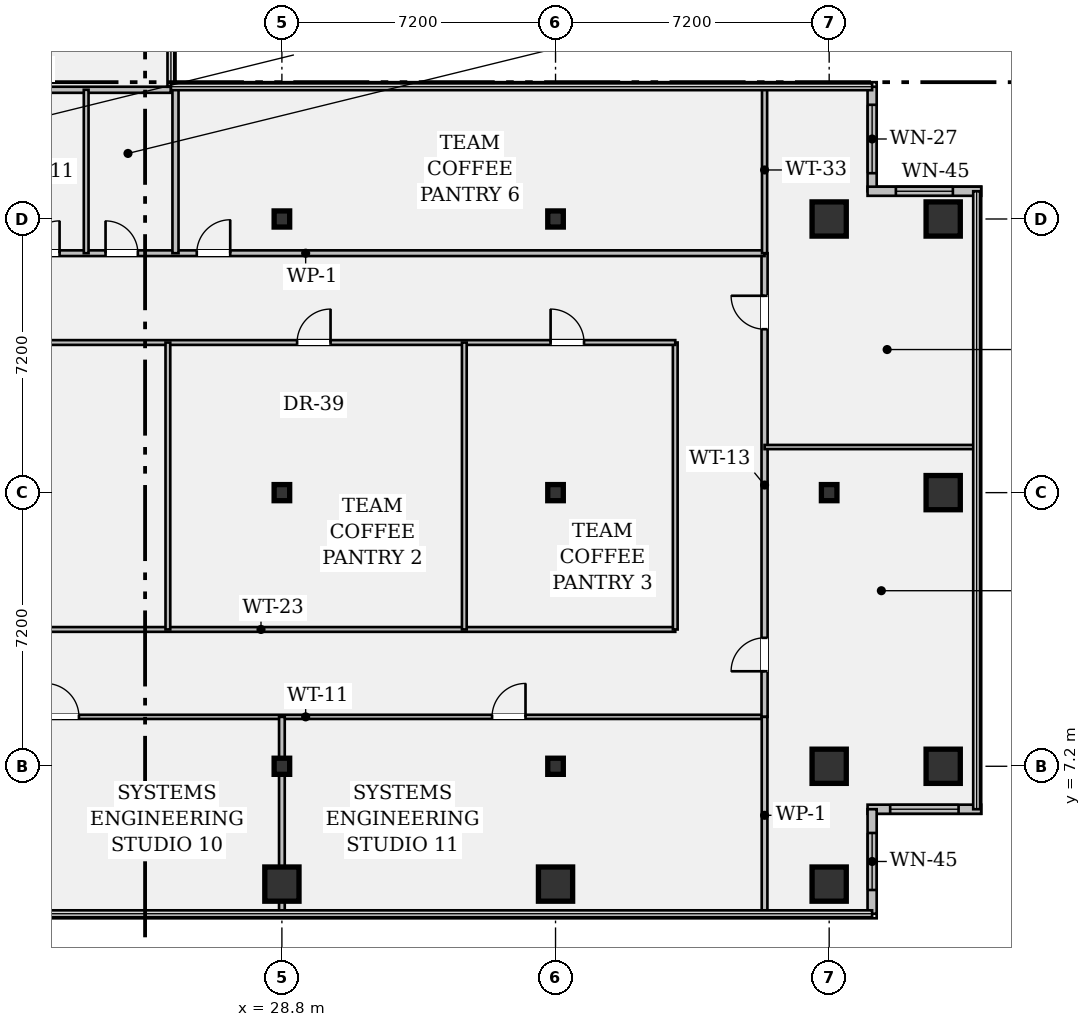
"""IFC4 building model, lengths in metres.
Left out: names, types, materials, properties, quantities, classifications, styles, units other than length and angle.
Written with IfcOpenShell. Run it as: python <this file> out.ifc"""

import sys

from ifc_helpers import new_model, si_unit, direction, frame, frame_2d, origin, origin_2d, place, context, subcontext, project, spatial, rectangle, hollow_rectangle, i_section, extrude, element, fill, save


model = new_model("IFC4")
c1 = context("Model", 3, precision=1e-05, world=origin(), true_north=direction((0.0, 1.0)))
c2 = subcontext(c1, "Body", "Model", "MODEL_VIEW")
j1 = project(units=[si_unit("LENGTHUNIT", "METRE"), si_unit("PLANEANGLEUNIT", "RADIAN")], contexts=[c1])
p1 = place(None, origin())
s1 = spatial("IfcSite", under=j1, at=p1, CompositionType="ELEMENT")
p2 = place(p1, origin())
s2 = spatial("IfcBuilding", under=s1, at=p2, CompositionType="ELEMENT")
p3 = place(p2, frame((0.0, 0.0, 121.45)))
s3 = spatial("IfcBuildingStorey", under=s2, at=p3, CompositionType="ELEMENT", Elevation=121.45)
p4 = place(p3, frame((28.8, 4.1, 0.0), z_axis=(0.0, 0.0, 1.0), x_axis=(1.0, 0.0, 0.0)))
e1 = element("IfcColumn", 1, at=p4, inside=s3, PredefinedType="COLUMN", context=c2, shape_type="SweptSolid", body=[
    extrude(hollow_rectangle(XDim=0.9, YDim=0.9, WallThickness=0.055, at=origin_2d()), origin(), (0.0, 0.0, 1.0), 3.58),
])
for number, where, z_axis, x_axis in (
    (2, (28.8, 7.2, 0.0), (0.0, 0.0, 1.0), (1.0, 0.0, 0.0)),
    (3, (28.8, 14.4, 0.0), (0.0, 0.0, 1.0), (1.0, 0.0, 0.0)),
    (4, (28.8, 21.6, 0.0), (0.0, 0.0, 1.0), (1.0, 0.0, 0.0)),
):
    element("IfcColumn", number, at=place(p3, frame(where, z_axis=z_axis, x_axis=x_axis)), inside=s3, PredefinedType="COLUMN", context=c2, shape_type="SweptSolid", body=[
        extrude(i_section(OverallWidth=0.409, OverallDepth=0.424, WebThickness=0.033, FlangeThickness=0.052, FilletRadius=0.018, at=origin_2d()), origin(), (0.0, 0.0, 1.0), 3.58),
    ])
p5 = place(p3, frame((36.0, 4.1, 0.0), z_axis=(0.0, 0.0, 1.0), x_axis=(1.0, 0.0, 0.0)))
e5 = element("IfcColumn", 5, at=p5, inside=s3, PredefinedType="COLUMN", context=c2, shape_type="SweptSolid", body=[
    extrude(hollow_rectangle(XDim=0.9, YDim=0.9, WallThickness=0.055, at=origin_2d()), origin(), (0.0, 0.0, 1.0), 3.58),
])
for number, where, z_axis, x_axis in (
    (6, (36.0, 7.2, 0.0), (0.0, 0.0, 1.0), (1.0, 0.0, 0.0)),
    (7, (36.0, 14.4, 0.0), (0.0, 0.0, 1.0), (1.0, 0.0, 0.0)),
    (8, (36.0, 21.6, 0.0), (0.0, 0.0, 1.0), (1.0, 0.0, 0.0)),
):
    element("IfcColumn", number, at=place(p3, frame(where, z_axis=z_axis, x_axis=x_axis)), inside=s3, PredefinedType="COLUMN", context=c2, shape_type="SweptSolid", body=[
        extrude(i_section(OverallWidth=0.409, OverallDepth=0.424, WebThickness=0.033, FlangeThickness=0.052, FilletRadius=0.018, at=origin_2d()), origin(), (0.0, 0.0, 1.0), 3.58),
    ])
for number, where, z_axis, x_axis in (
    (9, (43.2, 4.1, 0.0), (0.0, 0.0, 1.0), (1.0, 0.0, 0.0)),
    (10, (43.2, 7.2, 0.0), (0.0, 0.0, 1.0), (1.0, 0.0, 0.0)),
):
    element("IfcColumn", number, at=place(p3, frame(where, z_axis=z_axis, x_axis=x_axis)), inside=s3, PredefinedType="COLUMN", context=c2, shape_type="SweptSolid", body=[
        extrude(hollow_rectangle(XDim=0.9, YDim=0.9, WallThickness=0.055, at=origin_2d()), origin(), (0.0, 0.0, 1.0), 3.58),
    ])
p6 = place(p3, frame((43.2, 14.4, 0.0), z_axis=(0.0, 0.0, 1.0), x_axis=(1.0, 0.0, 0.0)))
e11 = element("IfcColumn", 11, at=p6, inside=s3, PredefinedType="COLUMN", context=c2, shape_type="SweptSolid", body=[
    extrude(i_section(OverallWidth=0.409, OverallDepth=0.424, WebThickness=0.033, FlangeThickness=0.052, FilletRadius=0.018, at=origin_2d()), origin(), (0.0, 0.0, 1.0), 3.58),
])
for number, where, z_axis, x_axis in (
    (12, (43.2, 21.6, 0.0), (0.0, 0.0, 1.0), (1.0, 0.0, 0.0)),
    (13, (46.2, 7.2, 0.0), (0.0, 0.0, 1.0), (1.0, 0.0, 0.0)),
    (14, (46.2, 14.4, 0.0), (0.0, 0.0, 1.0), (1.0, 0.0, 0.0)),
    (15, (46.2, 21.6, 0.0), (0.0, 0.0, 1.0), (1.0, 0.0, 0.0)),
):
    element("IfcColumn", number, at=place(p3, frame(where, z_axis=z_axis, x_axis=x_axis)), inside=s3, PredefinedType="COLUMN", context=c2, shape_type="SweptSolid", body=[
        extrude(hollow_rectangle(XDim=0.9, YDim=0.9, WallThickness=0.055, at=origin_2d()), origin(), (0.0, 0.0, 1.0), 3.58),
    ])
p7 = place(p3, frame((44.33, 25.08, 0.0), z_axis=(0.0, 0.0, 1.0), x_axis=(0.0, -1.0, 0.0)))
e16 = element("IfcWall", 16, at=p7, inside=s3, PredefinedType="STANDARD", context=c2, shape_type="SweptSolid", body=[
    extrude(rectangle(XDim=2.75, YDim=0.24, at=frame_2d((1.375, 0.0))), origin(), (0.0, 0.0, 1.0), 3.58),
])
p8 = place(p7, frame((0.475, 0.0, 0.95)))
e17 = element("IfcOpeningElement", 17, at=p8, cuts=e16, PredefinedType="OPENING", context=c2, shape_type="SweptSolid", body=[
    extrude(rectangle(XDim=1.8, YDim=1.35, at=frame_2d((0.9, 0.675))), frame((0.0, 0.132, 0.0), z_axis=(0.0, -1.0, 0.0), x_axis=(1.0, 0.0, 0.0)), (0.0, 0.0, 1.0), 0.264),
])
p9 = place(p3, frame((44.21, 22.33, 0.0), z_axis=(0.0, 0.0, 1.0), x_axis=(1.0, 0.0, 0.0)))
e18 = element("IfcWall", 18, at=p9, inside=s3, PredefinedType="STANDARD", context=c2, shape_type="SweptSolid", body=[
    extrude(rectangle(XDim=2.99, YDim=0.24, at=frame_2d((1.495, 0.0))), origin(), (0.0, 0.0, 1.0), 3.58),
])
p10 = place(p9, frame((0.745, 0.0, 0.95)))
e19 = element("IfcOpeningElement", 19, at=p10, cuts=e18, PredefinedType="OPENING", context=c2, shape_type="SweptSolid", body=[
    extrude(rectangle(XDim=1.5, YDim=1.8, at=frame_2d((0.75, 0.9))), frame((0.0, 0.132, 0.0), z_axis=(0.0, -1.0, 0.0), x_axis=(1.0, 0.0, 0.0)), (0.0, 0.0, 1.0), 0.264),
])
p11 = place(p3, frame((47.2, 6.07, 0.0), z_axis=(0.0, 0.0, 1.0), x_axis=(-1.0, 0.0, 0.0)))
e20 = element("IfcWall", 20, at=p11, inside=s3, PredefinedType="STANDARD", context=c2, shape_type="SweptSolid", body=[
    extrude(rectangle(XDim=2.99, YDim=0.24, at=frame_2d((1.495, 0.0))), origin(), (0.0, 0.0, 1.0), 3.58),
])
p12 = place(p11, frame((0.595, 0.0, 0.95)))
e21 = element("IfcOpeningElement", 21, at=p12, cuts=e20, PredefinedType="OPENING", context=c2, shape_type="SweptSolid", body=[
    extrude(rectangle(XDim=1.8, YDim=1.35, at=frame_2d((0.9, 0.675))), frame((0.0, 0.132, 0.0), z_axis=(0.0, -1.0, 0.0), x_axis=(1.0, 0.0, 0.0)), (0.0, 0.0, 1.0), 0.264),
])
p13 = place(p3, frame((44.33, 6.07, 0.0), z_axis=(0.0, 0.0, 1.0), x_axis=(0.0, -1.0, 0.0)))
e22 = element("IfcWall", 22, at=p13, inside=s3, PredefinedType="STANDARD", context=c2, shape_type="SweptSolid", body=[
    extrude(rectangle(XDim=2.75, YDim=0.24, at=frame_2d((1.375, 0.0))), origin(), (0.0, 0.0, 1.0), 3.58),
])
p14 = place(p13, frame((0.625, 0.0, 0.95)))
e23 = element("IfcOpeningElement", 23, at=p14, cuts=e22, PredefinedType="OPENING", context=c2, shape_type="SweptSolid", body=[
    extrude(rectangle(XDim=1.5, YDim=1.8, at=frame_2d((0.75, 0.9))), frame((0.0, 0.132, 0.0), z_axis=(0.0, -1.0, 0.0), x_axis=(1.0, 0.0, 0.0)), (0.0, 0.0, 1.0), 0.264),
])
p15 = place(p3, frame((17.35, 8.5, 0.0), z_axis=(0.0, 0.0, 1.0), x_axis=(1.0, 0.0, 0.0)))
e24 = element("IfcWall", 24, at=p15, inside=s3, PredefinedType="PARTITIONING", context=c2, shape_type="SweptSolid", body=[
    extrude(rectangle(XDim=24.15, YDim=0.11, at=frame_2d((12.075, 0.0))), origin(), (0.0, 0.0, 1.0), 2.869),
])
p16 = place(p15, frame((5.23, 0.0, 0.0)))
e25 = element("IfcOpeningElement", 25, at=p16, cuts=e24, PredefinedType="OPENING", context=c2, shape_type="SweptSolid", body=[
    extrude(rectangle(XDim=0.88, YDim=2.15, at=frame_2d((0.44, 1.075))), frame((0.0, 0.067, 0.0), z_axis=(0.0, -1.0, 0.0), x_axis=(1.0, 0.0, 0.0)), (0.0, 0.0, 1.0), 0.134),
])
p17 = place(p15, frame((16.98, 0.0, 0.0)))
e26 = element("IfcOpeningElement", 26, at=p17, cuts=e24, PredefinedType="OPENING", context=c2, shape_type="SweptSolid", body=[
    extrude(rectangle(XDim=0.88, YDim=2.15, at=frame_2d((0.44, 1.075))), frame((0.0, 0.067, 0.0), z_axis=(0.0, -1.0, 0.0), x_axis=(1.0, 0.0, 0.0)), (0.0, 0.0, 1.0), 0.134),
])
p18 = place(p3, frame((41.5, 8.5, 0.0), z_axis=(0.0, 0.0, 1.0), x_axis=(0.0, 1.0, 0.0)))
e27 = element("IfcWall", 27, at=p18, inside=s3, PredefinedType="PARTITIONING", context=c2, shape_type="SweptSolid", body=[
    extrude(rectangle(XDim=12.2, YDim=0.16, at=frame_2d((6.1, 0.0))), origin(), (0.0, 0.0, 1.0), 2.869),
])
p19 = place(p18, frame((1.2, 0.0, 0.0)))
e28 = element("IfcOpeningElement", 28, at=p19, cuts=e27, PredefinedType="OPENING", context=c2, shape_type="SweptSolid", body=[
    extrude(rectangle(XDim=0.88, YDim=2.15, at=frame_2d((0.44, 1.075))), frame((0.0, 0.092, 0.0), z_axis=(0.0, -1.0, 0.0), x_axis=(1.0, 0.0, 0.0)), (0.0, 0.0, 1.0), 0.184),
])
p20 = place(p18, frame((10.2, 0.0, 0.0)))
e29 = element("IfcOpeningElement", 29, at=p20, cuts=e27, PredefinedType="OPENING", context=c2, shape_type="SweptSolid", body=[
    extrude(rectangle(XDim=0.88, YDim=2.15, at=frame_2d((0.44, 1.075))), frame((0.0, 0.092, 0.0), z_axis=(0.0, -1.0, 0.0), x_axis=(1.0, 0.0, 0.0)), (0.0, 0.0, 1.0), 0.184),
])
p21 = place(p3, frame((17.35, 20.7, 0.0), z_axis=(0.0, 0.0, 1.0), x_axis=(1.0, 0.0, 0.0)))
e30 = element("IfcWall", 30, at=p21, inside=s3, PredefinedType="PARTITIONING", context=c2, shape_type="SweptSolid", body=[
    extrude(rectangle(XDim=24.15, YDim=0.15, at=frame_2d((12.075, 0.0))), origin(), (0.0, 0.0, 1.0), 2.869),
])
p22 = place(p21, frame((0.85, 0.0, 0.0)))
e31 = element("IfcOpeningElement", 31, at=p22, cuts=e30, PredefinedType="OPENING", context=c2, shape_type="SweptSolid", body=[
    extrude(rectangle(XDim=0.85, YDim=2.15, at=frame_2d((0.425, 1.075))), frame((0.0, 0.087, 0.0), z_axis=(0.0, -1.0, 0.0), x_axis=(1.0, 0.0, 0.0)), (0.0, 0.0, 1.0), 0.174),
])
p23 = place(p21, frame((4.75, 0.0, 0.0)))
e32 = element("IfcOpeningElement", 32, at=p23, cuts=e30, PredefinedType="OPENING", context=c2, shape_type="SweptSolid", body=[
    extrude(rectangle(XDim=0.85, YDim=2.15, at=frame_2d((0.425, 1.075))), frame((0.0, 0.087, 0.0), z_axis=(0.0, -1.0, 0.0), x_axis=(1.0, 0.0, 0.0)), (0.0, 0.0, 1.0), 0.174),
])
p24 = place(p21, frame((6.81, 0.0, 0.0)))
e33 = element("IfcOpeningElement", 33, at=p24, cuts=e30, PredefinedType="OPENING", context=c2, shape_type="SweptSolid", body=[
    extrude(rectangle(XDim=0.85, YDim=2.15, at=frame_2d((0.425, 1.075))), frame((0.0, 0.087, 0.0), z_axis=(0.0, -1.0, 0.0), x_axis=(1.0, 0.0, 0.0)), (0.0, 0.0, 1.0), 0.174),
])
p25 = place(p21, frame((9.21, 0.0, 0.0)))
e34 = element("IfcOpeningElement", 34, at=p25, cuts=e30, PredefinedType="OPENING", context=c2, shape_type="SweptSolid", body=[
    extrude(rectangle(XDim=0.88, YDim=2.15, at=frame_2d((0.44, 1.075))), frame((0.0, 0.087, 0.0), z_axis=(0.0, -1.0, 0.0), x_axis=(1.0, 0.0, 0.0)), (0.0, 0.0, 1.0), 0.174),
])
p26 = place(p3, frame((17.35, 10.8, 0.0), z_axis=(0.0, 0.0, 1.0), x_axis=(1.0, 0.0, 0.0)))
e35 = element("IfcWall", 35, at=p26, inside=s3, PredefinedType="PARTITIONING", context=c2, shape_type="SweptSolid", body=[
    extrude(rectangle(XDim=21.8, YDim=0.125, at=frame_2d((10.9, 0.0))), origin(), (0.0, 0.0, 1.0), 2.869),
])
p27 = place(p3, frame((39.15, 10.8, 0.0), z_axis=(0.0, 0.0, 1.0), x_axis=(0.0, 1.0, 0.0)))
e36 = element("IfcWall", 36, at=p27, inside=s3, PredefinedType="PARTITIONING", context=c2, shape_type="SweptSolid", body=[
    extrude(rectangle(XDim=7.55, YDim=0.125, at=frame_2d((3.775, 0.0))), origin(), (0.0, 0.0, 1.0), 2.869),
])
p28 = place(p3, frame((17.35, 18.35, 0.0), z_axis=(0.0, 0.0, 1.0), x_axis=(1.0, 0.0, 0.0)))
e37 = element("IfcWall", 37, at=p28, inside=s3, PredefinedType="PARTITIONING", context=c2, shape_type="SweptSolid", body=[
    extrude(rectangle(XDim=21.8, YDim=0.125, at=frame_2d((10.9, 0.0))), origin(), (0.0, 0.0, 1.0), 2.869),
])
p29 = place(p28, frame((3.73, 0.0, 0.0)))
e38 = element("IfcOpeningElement", 38, at=p29, cuts=e37, PredefinedType="OPENING", context=c2, shape_type="SweptSolid", body=[
    extrude(rectangle(XDim=0.88, YDim=2.15, at=frame_2d((0.44, 1.075))), frame((0.0, 0.074, 0.0), z_axis=(0.0, -1.0, 0.0), x_axis=(1.0, 0.0, 0.0)), (0.0, 0.0, 1.0), 0.149),
])
p30 = place(p28, frame((11.85, 0.0, 0.0)))
e39 = element("IfcOpeningElement", 39, at=p30, cuts=e37, PredefinedType="OPENING", context=c2, shape_type="SweptSolid", body=[
    extrude(rectangle(XDim=0.88, YDim=2.15, at=frame_2d((0.44, 1.075))), frame((0.0, 0.074, 0.0), z_axis=(0.0, -1.0, 0.0), x_axis=(1.0, 0.0, 0.0)), (0.0, 0.0, 1.0), 0.149),
])
p31 = place(p28, frame((18.52, 0.0, 0.0)))
e40 = element("IfcOpeningElement", 40, at=p31, cuts=e37, PredefinedType="OPENING", context=c2, shape_type="SweptSolid", body=[
    extrude(rectangle(XDim=0.88, YDim=2.15, at=frame_2d((0.44, 1.075))), frame((0.0, 0.074, 0.0), z_axis=(0.0, -1.0, 0.0), x_axis=(1.0, 0.0, 0.0)), (0.0, 0.0, 1.0), 0.149),
])
for number, where, z_axis, x_axis in (
    (41, (25.8, 10.8, 0.0), (0.0, 0.0, 1.0), (0.0, 1.0, 0.0)),
    (42, (33.6, 10.8, 0.0), (0.0, 0.0, 1.0), (0.0, 1.0, 0.0)),
):
    element("IfcWall", number, at=place(p3, frame(where, z_axis=z_axis, x_axis=x_axis)), inside=s3, PredefinedType="PARTITIONING", context=c2, shape_type="SweptSolid", body=[
        extrude(rectangle(XDim=7.55, YDim=0.125, at=frame_2d((3.775, 0.0))), origin(), (0.0, 0.0, 1.0), 2.869),
    ])
p32 = place(p3, frame((17.35, 25.0, 0.0), z_axis=(0.0, 0.0, 1.0), x_axis=(1.0, 0.0, 0.0)))
e43 = element("IfcWall", 43, at=p32, inside=s3, PredefinedType="PARTITIONING", context=c2, shape_type="SweptSolid", body=[
    extrude(rectangle(XDim=8.53, YDim=0.16, at=frame_2d((4.265, 0.0))), origin(), (0.0, 0.0, 1.0), 2.869),
])
p33 = place(p3, frame((23.65, 20.7, 0.0), z_axis=(0.0, 0.0, 1.0), x_axis=(0.0, 1.0, 0.0)))
e44 = element("IfcWall", 44, at=p33, inside=s3, PredefinedType="PARTITIONING", context=c2, shape_type="SweptSolid", body=[
    extrude(rectangle(XDim=4.3, YDim=0.125, at=frame_2d((2.15, 0.0))), origin(), (0.0, 0.0, 1.0), 2.869),
])
p34 = place(p3, frame((26.0, 20.7, 0.0), z_axis=(0.0, 0.0, 1.0), x_axis=(0.0, 1.0, 0.0)))
e45 = element("IfcWall", 45, at=p34, inside=s3, PredefinedType="PARTITIONING", context=c2, shape_type="SweptSolid", body=[
    extrude(rectangle(XDim=4.38, YDim=0.16, at=frame_2d((2.19, 0.0))), origin(), (0.0, 0.0, 1.0), 2.869),
])
p35 = place(p3, frame((41.5, 3.32, 0.0), z_axis=(0.0, 0.0, 1.0), x_axis=(0.0, 1.0, 0.0)))
e46 = element("IfcWall", 46, at=p35, inside=s3, PredefinedType="PARTITIONING", context=c2, shape_type="SweptSolid", body=[
    extrude(rectangle(XDim=5.18, YDim=0.15, at=frame_2d((2.59, 0.0))), origin(), (0.0, 0.0, 1.0), 2.869),
])
p36 = place(p3, frame((41.5, 20.7, 0.0), z_axis=(0.0, 0.0, 1.0), x_axis=(0.0, 1.0, 0.0)))
e47 = element("IfcWall", 47, at=p36, inside=s3, PredefinedType="PARTITIONING", context=c2, shape_type="SweptSolid", body=[
    extrude(rectangle(XDim=4.38, YDim=0.135, at=frame_2d((2.19, 0.0))), origin(), (0.0, 0.0, 1.0), 2.869),
])
p37 = place(p3, frame((41.5, 15.6, 0.0), z_axis=(0.0, 0.0, 1.0), x_axis=(1.0, 0.0, 0.0)))
e48 = element("IfcWall", 48, at=p37, inside=s3, PredefinedType="PARTITIONING", context=c2, shape_type="SweptSolid", body=[
    extrude(rectangle(XDim=5.58, YDim=0.11, at=frame_2d((2.79, 0.0))), origin(), (0.0, 0.0, 1.0), 2.869),
])
p38 = place(p3, frame((28.8, 3.32, 0.0), z_axis=(0.0, 0.0, 1.0), x_axis=(0.0, 1.0, 0.0)))
e49 = element("IfcWall", 49, at=p38, inside=s3, PredefinedType="PARTITIONING", context=c2, shape_type="SweptSolid", body=[
    extrude(rectangle(XDim=5.18, YDim=0.15, at=frame_2d((2.59, 0.0))), origin(), (0.0, 0.0, 1.0), 2.869),
])
p39 = place(p8, origin())
e50 = element("IfcWindow", 50, at=p39, inside=s3, PartitioningType="SINGLE_PANEL", PredefinedType="WINDOW", context=c2, shape_type="SweptSolid", body=[
    extrude(rectangle(XDim=1.8, YDim=1.35, at=frame_2d((0.9, 0.675))), frame((0.0, 0.03, 0.0), z_axis=(0.0, -1.0, 0.0), x_axis=(1.0, 0.0, 0.0)), (0.0, 0.0, 1.0), 0.06),
])
fill(e17, e50)
p40 = place(p10, origin())
e51 = element("IfcWindow", 51, at=p40, inside=s3, PartitioningType="SINGLE_PANEL", PredefinedType="WINDOW", context=c2, shape_type="SweptSolid", body=[
    extrude(rectangle(XDim=1.5, YDim=1.8, at=frame_2d((0.75, 0.9))), frame((0.0, 0.03, 0.0), z_axis=(0.0, -1.0, 0.0), x_axis=(1.0, 0.0, 0.0)), (0.0, 0.0, 1.0), 0.06),
])
fill(e19, e51)
p41 = place(p12, origin())
e52 = element("IfcWindow", 52, at=p41, inside=s3, PartitioningType="SINGLE_PANEL", PredefinedType="WINDOW", context=c2, shape_type="SweptSolid", body=[
    extrude(rectangle(XDim=1.8, YDim=1.35, at=frame_2d((0.9, 0.675))), frame((0.0, 0.03, 0.0), z_axis=(0.0, -1.0, 0.0), x_axis=(1.0, 0.0, 0.0)), (0.0, 0.0, 1.0), 0.06),
])
fill(e21, e52)
p42 = place(p14, origin())
e53 = element("IfcWindow", 53, at=p42, inside=s3, PartitioningType="SINGLE_PANEL", PredefinedType="WINDOW", context=c2, shape_type="SweptSolid", body=[
    extrude(rectangle(XDim=1.5, YDim=1.8, at=frame_2d((0.75, 0.9))), frame((0.0, 0.03, 0.0), z_axis=(0.0, -1.0, 0.0), x_axis=(1.0, 0.0, 0.0)), (0.0, 0.0, 1.0), 0.06),
])
fill(e23, e53)
p43 = place(p30, origin())
e54 = element("IfcDoor", 54, at=p43, inside=s3, OperationType="SINGLE_SWING_RIGHT", PredefinedType="DOOR", context=c2, shape_type="SweptSolid", body=[
    extrude(rectangle(XDim=0.88, YDim=2.15, at=frame_2d((0.44, 1.075))), frame((0.0, 0.025, 0.0), z_axis=(0.0, -1.0, 0.0), x_axis=(1.0, 0.0, 0.0)), (0.0, 0.0, 1.0), 0.05),
])
fill(e39, e54)
p44 = place(p31, origin())
e55 = element("IfcDoor", 55, at=p44, inside=s3, OperationType="SINGLE_SWING_LEFT", PredefinedType="DOOR", context=c2, shape_type="SweptSolid", body=[
    extrude(rectangle(XDim=0.88, YDim=2.15, at=frame_2d((0.44, 1.075))), frame((0.0, 0.025, 0.0), z_axis=(0.0, -1.0, 0.0), x_axis=(1.0, 0.0, 0.0)), (0.0, 0.0, 1.0), 0.05),
])
fill(e40, e55)
p45 = place(p23, origin())
e56 = element("IfcDoor", 56, at=p45, inside=s3, OperationType="SINGLE_SWING_RIGHT", PredefinedType="DOOR", context=c2, shape_type="SweptSolid", body=[
    extrude(rectangle(XDim=0.85, YDim=2.15, at=frame_2d((0.425, 1.075))), frame((0.0, 0.025, 0.0), z_axis=(0.0, -1.0, 0.0), x_axis=(1.0, 0.0, 0.0)), (0.0, 0.0, 1.0), 0.05),
])
fill(e32, e56)
p46 = place(p24, origin())
e57 = element("IfcDoor", 57, at=p46, inside=s3, OperationType="SINGLE_SWING_LEFT", PredefinedType="DOOR", context=c2, shape_type="SweptSolid", body=[
    extrude(rectangle(XDim=0.85, YDim=2.15, at=frame_2d((0.425, 1.075))), frame((0.0, 0.025, 0.0), z_axis=(0.0, -1.0, 0.0), x_axis=(1.0, 0.0, 0.0)), (0.0, 0.0, 1.0), 0.05),
])
fill(e33, e57)
p47 = place(p25, origin())
e58 = element("IfcDoor", 58, at=p47, inside=s3, OperationType="SINGLE_SWING_RIGHT", PredefinedType="DOOR", context=c2, shape_type="SweptSolid", body=[
    extrude(rectangle(XDim=0.88, YDim=2.15, at=frame_2d((0.44, 1.075))), frame((0.0, 0.025, 0.0), z_axis=(0.0, -1.0, 0.0), x_axis=(1.0, 0.0, 0.0)), (0.0, 0.0, 1.0), 0.05),
])
fill(e34, e58)
p48 = place(p19, origin())
e59 = element("IfcDoor", 59, at=p48, inside=s3, OperationType="SINGLE_SWING_LEFT", PredefinedType="DOOR", context=c2, shape_type="SweptSolid", body=[
    extrude(rectangle(XDim=0.88, YDim=2.15, at=frame_2d((0.44, 1.075))), frame((0.0, 0.025, 0.0), z_axis=(0.0, -1.0, 0.0), x_axis=(1.0, 0.0, 0.0)), (0.0, 0.0, 1.0), 0.05),
])
fill(e28, e59)
p49 = place(p20, origin())
e60 = element("IfcDoor", 60, at=p49, inside=s3, OperationType="SINGLE_SWING_RIGHT", PredefinedType="DOOR", context=c2, shape_type="SweptSolid", body=[
    extrude(rectangle(XDim=0.88, YDim=2.15, at=frame_2d((0.44, 1.075))), frame((0.0, 0.025, 0.0), z_axis=(0.0, -1.0, 0.0), x_axis=(1.0, 0.0, 0.0)), (0.0, 0.0, 1.0), 0.05),
])
fill(e29, e60)
p50 = place(p16, origin())
e61 = element("IfcDoor", 61, at=p50, inside=s3, OperationType="SINGLE_SWING_LEFT", PredefinedType="DOOR", context=c2, shape_type="SweptSolid", body=[
    extrude(rectangle(XDim=0.88, YDim=2.15, at=frame_2d((0.44, 1.075))), frame((0.0, 0.025, 0.0), z_axis=(0.0, -1.0, 0.0), x_axis=(1.0, 0.0, 0.0)), (0.0, 0.0, 1.0), 0.05),
])
fill(e25, e61)
p51 = place(p17, origin())
e62 = element("IfcDoor", 62, at=p51, inside=s3, OperationType="SINGLE_SWING_RIGHT", PredefinedType="DOOR", context=c2, shape_type="SweptSolid", body=[
    extrude(rectangle(XDim=0.88, YDim=2.15, at=frame_2d((0.44, 1.075))), frame((0.0, 0.025, 0.0), z_axis=(0.0, -1.0, 0.0), x_axis=(1.0, 0.0, 0.0)), (0.0, 0.0, 1.0), 0.05),
])
fill(e26, e62)
save(model, sys.argv[1])
